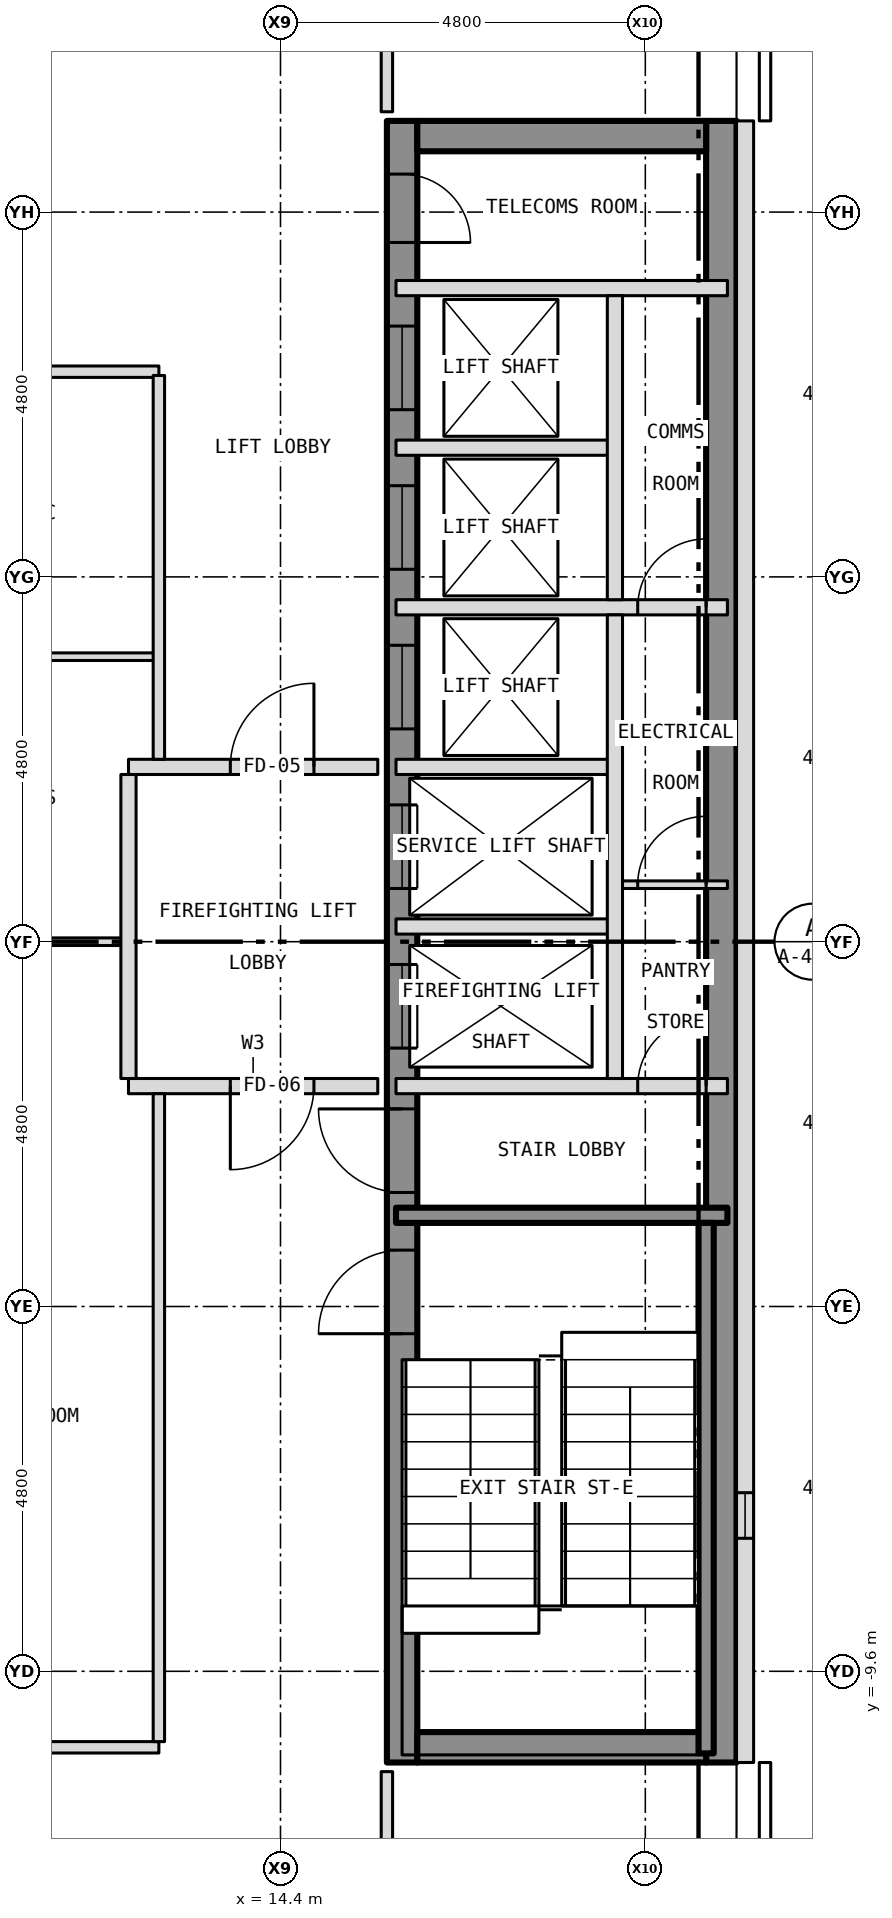
"""IFC4 building model, lengths in metres.
Left out: names, types, materials, properties, quantities, classifications, styles, units other than length and angle.
Written with IfcOpenShell. Run it as: python <this file> out.ifc"""

import sys

from ifc_helpers import new_model, si_unit, direction, frame, frame_2d, origin, place, context, subcontext, project, spatial, rectangle, extrude, element, fill, save


model = new_model("IFC4")
c1 = context("Model", 3, precision=1e-05, world=origin(), true_north=direction((0.0, 1.0)))
c2 = subcontext(c1, "Body", "Model", "MODEL_VIEW")
j1 = project(units=[si_unit("LENGTHUNIT", "METRE"), si_unit("PLANEANGLEUNIT", "RADIAN")], contexts=[c1])
p1 = place(None, origin())
s1 = spatial("IfcSite", under=j1, at=p1, CompositionType="ELEMENT")
p2 = place(p1, origin())
s2 = spatial("IfcBuilding", under=s1, at=p2, CompositionType="ELEMENT")
p3 = place(p2, frame((0.0, 0.0, 262.0)))
s3 = spatial("IfcBuildingStorey", under=s2, at=p3, CompositionType="ELEMENT", Elevation=262.0)
p4 = place(p3, frame((16.0, -10.8, 0.0), z_axis=(0.0, 0.0, 1.0), x_axis=(0.0, 1.0, 0.0)))
e1 = element("IfcWall", 1, at=p4, inside=s3, PredefinedType="SHEAR", context=c2, shape_type="SweptSolid", body=[
    extrude(rectangle(XDim=21.6, YDim=0.4, at=frame_2d((10.8, 0.0))), origin(), (0.0, 0.0, 1.0), 3.25),
])
p5 = place(p4, frame((9.4, 0.0, 0.0)))
e2 = element("IfcOpeningElement", 2, at=p5, cuts=e1, PredefinedType="OPENING", context=c2, shape_type="SweptSolid", body=[
    extrude(rectangle(XDim=1.1, YDim=2.1, at=frame_2d((0.55, 1.05))), frame((0.0, 0.212, 0.0), z_axis=(0.0, -1.0, 0.0), x_axis=(1.0, 0.0, 0.0)), (0.0, 0.0, 1.0), 0.424),
])
p6 = place(p4, frame((11.5, 0.0, 0.0)))
e3 = element("IfcOpeningElement", 3, at=p6, cuts=e1, PredefinedType="OPENING", context=c2, shape_type="SweptSolid", body=[
    extrude(rectangle(XDim=1.1, YDim=2.1, at=frame_2d((0.55, 1.05))), frame((0.0, 0.212, 0.0), z_axis=(0.0, -1.0, 0.0), x_axis=(1.0, 0.0, 0.0)), (0.0, 0.0, 1.0), 0.424),
])
p7 = place(p4, frame((13.6, 0.0, 0.0)))
e4 = element("IfcOpeningElement", 4, at=p7, cuts=e1, PredefinedType="OPENING", context=c2, shape_type="SweptSolid", body=[
    extrude(rectangle(XDim=1.1, YDim=2.1, at=frame_2d((0.55, 1.05))), frame((0.0, 0.212, 0.0), z_axis=(0.0, -1.0, 0.0), x_axis=(1.0, 0.0, 0.0)), (0.0, 0.0, 1.0), 0.424),
])
p8 = place(p4, frame((15.7, 0.0, 0.0)))
e5 = element("IfcOpeningElement", 5, at=p8, cuts=e1, PredefinedType="OPENING", context=c2, shape_type="SweptSolid", body=[
    extrude(rectangle(XDim=1.1, YDim=2.1, at=frame_2d((0.55, 1.05))), frame((0.0, 0.212, 0.0), z_axis=(0.0, -1.0, 0.0), x_axis=(1.0, 0.0, 0.0)), (0.0, 0.0, 1.0), 0.424),
])
p9 = place(p4, frame((17.8, 0.0, 0.0)))
e6 = element("IfcOpeningElement", 6, at=p9, cuts=e1, PredefinedType="OPENING", context=c2, shape_type="SweptSolid", body=[
    extrude(rectangle(XDim=1.1, YDim=2.1, at=frame_2d((0.55, 1.05))), frame((0.0, 0.212, 0.0), z_axis=(0.0, -1.0, 0.0), x_axis=(1.0, 0.0, 0.0)), (0.0, 0.0, 1.0), 0.424),
])
p10 = place(p4, frame((5.642, 0.0, 0.0)))
e7 = element("IfcOpeningElement", 7, at=p10, cuts=e1, PredefinedType="OPENING", context=c2, shape_type="SweptSolid", body=[
    extrude(rectangle(XDim=1.1, YDim=2.1, at=frame_2d((0.55, 1.05))), frame((0.0, 0.212, 0.0), z_axis=(0.0, -1.0, 0.0), x_axis=(1.0, 0.0, 0.0)), (0.0, 0.0, 1.0), 0.424),
])
p11 = place(p4, frame((7.5, 0.0, 0.0)))
e8 = element("IfcOpeningElement", 8, at=p11, cuts=e1, PredefinedType="OPENING", context=c2, shape_type="SweptSolid", body=[
    extrude(rectangle(XDim=1.1, YDim=2.1, at=frame_2d((0.55, 1.05))), frame((0.0, 0.212, 0.0), z_axis=(0.0, -1.0, 0.0), x_axis=(1.0, 0.0, 0.0)), (0.0, 0.0, 1.0), 0.424),
])
p12 = place(p4, frame((20.0, 0.0, 0.0)))
e9 = element("IfcOpeningElement", 9, at=p12, cuts=e1, PredefinedType="OPENING", context=c2, shape_type="SweptSolid", body=[
    extrude(rectangle(XDim=0.9, YDim=2.1, at=frame_2d((0.45, 1.05))), frame((0.0, 0.212, 0.0), z_axis=(0.0, -1.0, 0.0), x_axis=(1.0, 0.0, 0.0)), (0.0, 0.0, 1.0), 0.424),
])
p13 = place(p3, frame((20.2, -10.8, 0.0), z_axis=(0.0, 0.0, 1.0), x_axis=(0.0, 1.0, 0.0)))
e10 = element("IfcWall", 10, at=p13, inside=s3, PredefinedType="SHEAR", context=c2, shape_type="SweptSolid", body=[
    extrude(rectangle(XDim=21.6, YDim=0.4, at=frame_2d((10.8, 0.0))), origin(), (0.0, 0.0, 1.0), 3.25),
])
for number, where, z_axis, x_axis in (
    (11, (16.2, 10.6, 0.0), (0.0, 0.0, 1.0), (1.0, 0.0, 0.0)),
    (12, (16.2, -10.6, 0.0), (0.0, 0.0, 1.0), (1.0, 0.0, 0.0)),
):
    element("IfcWall", number, at=place(p3, frame(where, z_axis=z_axis, x_axis=x_axis)), inside=s3, PredefinedType="SHEAR", context=c2, shape_type="SweptSolid", body=[
        extrude(rectangle(XDim=3.8, YDim=0.4, at=frame_2d((1.9, 0.0))), origin(), (0.0, 0.0, 1.0), 3.25),
    ])
p14 = place(p3, frame((20.512, -10.8, 0.0), z_axis=(0.0, 0.0, 1.0), x_axis=(0.0, 1.0, 0.0)))
e13 = element("IfcWall", 13, at=p14, inside=s3, PredefinedType="SOLIDWALL", context=c2, shape_type="SweptSolid", body=[
    extrude(rectangle(XDim=21.6, YDim=0.225, at=frame_2d((10.8, 0.0))), origin(), (0.0, 0.0, 1.0), 3.5),
])
p15 = place(p14, frame((2.95, 0.0, 1.0)))
e14 = element("IfcOpeningElement", 14, at=p15, cuts=e13, PredefinedType="OPENING", context=c2, shape_type="SweptSolid", body=[
    extrude(rectangle(XDim=0.6, YDim=1.5, at=frame_2d((0.3, 0.75))), frame((0.0, 0.125, 0.0), z_axis=(0.0, -1.0, 0.0), x_axis=(1.0, 0.0, 0.0)), (0.0, 0.0, 1.0), 0.249),
])
p16 = place(p3, frame((8.1, -10.6, 0.0), z_axis=(0.0, 0.0, 1.0), x_axis=(1.0, 0.0, 0.0)))
e15 = element("IfcWall", 15, at=p16, inside=s3, PredefinedType="PARTITIONING", context=c2, shape_type="SweptSolid", body=[
    extrude(rectangle(XDim=4.7, YDim=0.15, at=frame_2d((2.35, 0.0))), origin(), (0.0, 0.0, 1.0), 3.25),
])
p17 = place(p3, frame((15.92, -3.6, 0.0), z_axis=(0.0, 0.0, 1.0), x_axis=(1.0, 0.0, 0.0)))
e16 = element("IfcWall", 16, at=p17, inside=s3, PredefinedType="SHEAR", context=c2, shape_type="SweptSolid", body=[
    extrude(rectangle(XDim=4.36, YDim=0.2, at=frame_2d((2.18, 0.0))), origin(), (0.0, 0.0, 1.0), 3.25),
])
p18 = place(p3, frame((12.4, -1.9, 0.0), z_axis=(0.0, 0.0, 1.0), x_axis=(1.0, 0.0, 0.0)))
e17 = element("IfcWall", 17, at=p18, inside=s3, PredefinedType="PARTITIONING", context=c2, shape_type="SweptSolid", body=[
    extrude(rectangle(XDim=3.28, YDim=0.2, at=frame_2d((1.64, 0.0))), origin(), (0.0, 0.0, 1.0), 3.25),
])
p19 = place(p18, frame((1.34, 0.0, 0.0)))
e18 = element("IfcOpeningElement", 18, at=p19, cuts=e17, PredefinedType="OPENING", context=c2, shape_type="SweptSolid", body=[
    extrude(rectangle(XDim=1.1, YDim=2.1, at=frame_2d((0.55, 1.05))), frame((0.0, 0.112, 0.0), z_axis=(0.0, -1.0, 0.0), x_axis=(1.0, 0.0, 0.0)), (0.0, 0.0, 1.0), 0.224),
])
p20 = place(p3, frame((15.92, -1.9, 0.0), z_axis=(0.0, 0.0, 1.0), x_axis=(1.0, 0.0, 0.0)))
e19 = element("IfcWall", 19, at=p20, inside=s3, PredefinedType="PARTITIONING", context=c2, shape_type="SweptSolid", body=[
    extrude(rectangle(XDim=4.36, YDim=0.2, at=frame_2d((2.18, 0.0))), origin(), (0.0, 0.0, 1.0), 3.25),
])
p21 = place(p20, frame((3.18, 0.0, 0.0)))
e20 = element("IfcOpeningElement", 20, at=p21, cuts=e19, PredefinedType="OPENING", context=c2, shape_type="SweptSolid", body=[
    extrude(rectangle(XDim=0.9, YDim=2.1, at=frame_2d((0.45, 1.05))), frame((0.0, 0.112, 0.0), z_axis=(0.0, -1.0, 0.0), x_axis=(1.0, 0.0, 0.0)), (0.0, 0.0, 1.0), 0.224),
])
p22 = place(p3, frame((9.784, 0.0, 0.0), z_axis=(0.0, 0.0, 1.0), x_axis=(1.0, 0.0, 0.0)))
e21 = element("IfcWall", 21, at=p22, inside=s3, PredefinedType="PARTITIONING", context=c2, shape_type="SweptSolid", body=[
    extrude(rectangle(XDim=2.616, YDim=0.1, at=frame_2d((1.308, 0.0))), origin(), (0.0, 0.0, 1.0), 2.16),
])
p23 = place(p3, frame((15.92, 0.2, 0.0), z_axis=(0.0, 0.0, 1.0), x_axis=(1.0, 0.0, 0.0)))
e22 = element("IfcWall", 22, at=p23, inside=s3, PredefinedType="PARTITIONING", context=c2, shape_type="SweptSolid", body=[
    extrude(rectangle(XDim=2.88, YDim=0.2, at=frame_2d((1.44, 0.0))), origin(), (0.0, 0.0, 1.0), 3.25),
])
p24 = place(p3, frame((18.8, 0.75, 0.0), z_axis=(0.0, 0.0, 1.0), x_axis=(1.0, 0.0, 0.0)))
e23 = element("IfcWall", 23, at=p24, inside=s3, PredefinedType="PARTITIONING", context=c2, shape_type="SweptSolid", body=[
    extrude(rectangle(XDim=1.48, YDim=0.1, at=frame_2d((0.74, 0.0))), origin(), (0.0, 0.0, 1.0), 3.25),
])
p25 = place(p24, frame((0.3, 0.0, 0.0)))
e24 = element("IfcOpeningElement", 24, at=p25, cuts=e23, PredefinedType="OPENING", context=c2, shape_type="SweptSolid", body=[
    extrude(rectangle(XDim=0.9, YDim=2.1, at=frame_2d((0.45, 1.05))), frame((0.0, 0.062, 0.0), z_axis=(0.0, -1.0, 0.0), x_axis=(1.0, 0.0, 0.0)), (0.0, 0.0, 1.0), 0.124),
])
p26 = place(p3, frame((12.4, 2.3, 0.0), z_axis=(0.0, 0.0, 1.0), x_axis=(1.0, 0.0, 0.0)))
e25 = element("IfcWall", 25, at=p26, inside=s3, PredefinedType="PARTITIONING", context=c2, shape_type="SweptSolid", body=[
    extrude(rectangle(XDim=3.28, YDim=0.2, at=frame_2d((1.64, 0.0))), origin(), (0.0, 0.0, 1.0), 3.25),
])
p27 = place(p26, frame((1.34, 0.0, 0.0)))
e26 = element("IfcOpeningElement", 26, at=p27, cuts=e25, PredefinedType="OPENING", context=c2, shape_type="SweptSolid", body=[
    extrude(rectangle(XDim=1.1, YDim=2.1, at=frame_2d((0.55, 1.05))), frame((0.0, 0.112, 0.0), z_axis=(0.0, -1.0, 0.0), x_axis=(1.0, 0.0, 0.0)), (0.0, 0.0, 1.0), 0.224),
])
p28 = place(p3, frame((15.92, 2.3, 0.0), z_axis=(0.0, 0.0, 1.0), x_axis=(1.0, 0.0, 0.0)))
e27 = element("IfcWall", 27, at=p28, inside=s3, PredefinedType="PARTITIONING", context=c2, shape_type="SweptSolid", body=[
    extrude(rectangle(XDim=2.88, YDim=0.2, at=frame_2d((1.44, 0.0))), origin(), (0.0, 0.0, 1.0), 3.25),
])
p29 = place(p3, frame((8.1, 3.75, 0.0), z_axis=(0.0, 0.0, 1.0), x_axis=(1.0, 0.0, 0.0)))
e28 = element("IfcWall", 28, at=p29, inside=s3, PredefinedType="PARTITIONING", context=c2, shape_type="SweptSolid", body=[
    extrude(rectangle(XDim=4.7, YDim=0.1, at=frame_2d((2.35, 0.0))), origin(), (0.0, 0.0, 1.0), 3.25),
])
p30 = place(p3, frame((15.92, 4.4, 0.0), z_axis=(0.0, 0.0, 1.0), x_axis=(1.0, 0.0, 0.0)))
e29 = element("IfcWall", 29, at=p30, inside=s3, PredefinedType="PARTITIONING", context=c2, shape_type="SweptSolid", body=[
    extrude(rectangle(XDim=4.36, YDim=0.2, at=frame_2d((2.18, 0.0))), origin(), (0.0, 0.0, 1.0), 3.25),
])
p31 = place(p30, frame((3.18, 0.0, 0.0)))
e30 = element("IfcOpeningElement", 30, at=p31, cuts=e29, PredefinedType="OPENING", context=c2, shape_type="SweptSolid", body=[
    extrude(rectangle(XDim=0.9, YDim=2.1, at=frame_2d((0.45, 1.05))), frame((0.0, 0.112, 0.0), z_axis=(0.0, -1.0, 0.0), x_axis=(1.0, 0.0, 0.0)), (0.0, 0.0, 1.0), 0.224),
])
p32 = place(p3, frame((15.92, 6.5, 0.0), z_axis=(0.0, 0.0, 1.0), x_axis=(1.0, 0.0, 0.0)))
e31 = element("IfcWall", 31, at=p32, inside=s3, PredefinedType="PARTITIONING", context=c2, shape_type="SweptSolid", body=[
    extrude(rectangle(XDim=2.88, YDim=0.2, at=frame_2d((1.44, 0.0))), origin(), (0.0, 0.0, 1.0), 3.25),
])
p33 = place(p3, frame((8.1, 7.5, 0.0), z_axis=(0.0, 0.0, 1.0), x_axis=(1.0, 0.0, 0.0)))
e32 = element("IfcWall", 32, at=p33, inside=s3, PredefinedType="PARTITIONING", context=c2, shape_type="SweptSolid", body=[
    extrude(rectangle(XDim=4.7, YDim=0.15, at=frame_2d((2.35, 0.0))), origin(), (0.0, 0.0, 1.0), 3.25),
])
p34 = place(p33, frame((1.9, 0.0, 0.0)))
e33 = element("IfcOpeningElement", 33, at=p34, cuts=e32, PredefinedType="OPENING", context=c2, shape_type="SweptSolid", body=[
    extrude(rectangle(XDim=0.9, YDim=2.1, at=frame_2d((0.45, 1.05))), frame((0.0, 0.087, 0.0), z_axis=(0.0, -1.0, 0.0), x_axis=(1.0, 0.0, 0.0)), (0.0, 0.0, 1.0), 0.174),
])
p35 = place(p3, frame((15.92, 8.6, 0.0), z_axis=(0.0, 0.0, 1.0), x_axis=(1.0, 0.0, 0.0)))
e34 = element("IfcWall", 34, at=p35, inside=s3, PredefinedType="PARTITIONING", context=c2, shape_type="SweptSolid", body=[
    extrude(rectangle(XDim=4.36, YDim=0.2, at=frame_2d((2.18, 0.0))), origin(), (0.0, 0.0, 1.0), 3.25),
])
p36 = place(p3, frame((12.4, -1.8, 0.0), z_axis=(0.0, 0.0, 1.0), x_axis=(0.0, 1.0, 0.0)))
e35 = element("IfcWall", 35, at=p36, inside=s3, PredefinedType="PARTITIONING", context=c2, shape_type="SweptSolid", body=[
    extrude(rectangle(XDim=4.0, YDim=0.2, at=frame_2d((2.0, 0.0))), origin(), (0.0, 0.0, 1.0), 3.25),
])
p37 = place(p3, frame((12.8, -10.525, 0.0), z_axis=(0.0, 0.0, 1.0), x_axis=(0.0, 1.0, 0.0)))
e36 = element("IfcWall", 36, at=p37, inside=s3, PredefinedType="PARTITIONING", context=c2, shape_type="SweptSolid", body=[
    extrude(rectangle(XDim=8.525, YDim=0.15, at=frame_2d((4.262, 0.0))), origin(), (0.0, 0.0, 1.0), 3.25),
])
p38 = place(p3, frame((12.8, 2.4, 0.0), z_axis=(0.0, 0.0, 1.0), x_axis=(0.0, 1.0, 0.0)))
e37 = element("IfcWall", 37, at=p38, inside=s3, PredefinedType="PARTITIONING", context=c2, shape_type="SweptSolid", body=[
    extrude(rectangle(XDim=5.05, YDim=0.15, at=frame_2d((2.525, 0.0))), origin(), (0.0, 0.0, 1.0), 3.25),
])
for number, where, z_axis, x_axis in (
    (38, (15.8, -12.725, 0.0), (0.0, 0.0, 1.0), (0.0, 1.0, 0.0)),
    (39, (15.8, 10.92, 0.0), (0.0, 0.0, 1.0), (0.0, 1.0, 0.0)),
):
    element("IfcWall", number, at=place(p3, frame(where, z_axis=z_axis, x_axis=x_axis)), inside=s3, PredefinedType="PARTITIONING", context=c2, shape_type="SweptSolid", body=[
        extrude(rectangle(XDim=1.805, YDim=0.15, at=frame_2d((0.903, 0.0))), origin(), (0.0, 0.0, 1.0), 3.25),
    ])
p39 = place(p3, frame((18.8, -1.8, 0.0), z_axis=(0.0, 0.0, 1.0), x_axis=(0.0, 1.0, 0.0)))
e40 = element("IfcWall", 40, at=p39, inside=s3, PredefinedType="PARTITIONING", context=c2, shape_type="SweptSolid", body=[
    extrude(rectangle(XDim=6.1, YDim=0.2, at=frame_2d((3.05, 0.0))), origin(), (0.0, 0.0, 1.0), 3.25),
])
p40 = place(p3, frame((18.8, 4.5, 0.0), z_axis=(0.0, 0.0, 1.0), x_axis=(0.0, 1.0, 0.0)))
e41 = element("IfcWall", 41, at=p40, inside=s3, PredefinedType="PARTITIONING", context=c2, shape_type="SweptSolid", body=[
    extrude(rectangle(XDim=4.0, YDim=0.2, at=frame_2d((2.0, 0.0))), origin(), (0.0, 0.0, 1.0), 3.25),
])
p41 = place(p3, frame((20.0, -10.68, 0.0), z_axis=(0.0, 0.0, 1.0), x_axis=(0.0, 1.0, 0.0)))
e42 = element("IfcWall", 42, at=p41, inside=s3, PredefinedType="SHEAR", context=c2, shape_type="SweptSolid", body=[
    extrude(rectangle(XDim=6.98, YDim=0.2, at=frame_2d((3.49, 0.0))), origin(), (0.0, 0.0, 1.0), 3.25),
])
p42 = place(p15, origin())
e43 = element("IfcWindow", 43, at=p42, inside=s3, PartitioningType="SINGLE_PANEL", PredefinedType="WINDOW", context=c2, shape_type="SweptSolid", body=[
    extrude(rectangle(XDim=0.6, YDim=1.5, at=frame_2d((0.3, 0.75))), frame((0.0, -0.022, 0.0), z_axis=(0.0, -1.0, 0.0), x_axis=(1.0, 0.0, 0.0)), (0.0, 0.0, 1.0), 0.06),
])
fill(e14, e43)
p43 = place(p5, origin())
e44 = element("IfcDoor", 44, at=p43, inside=s3, OperationType="SLIDING_TO_LEFT", PredefinedType="DOOR", context=c2, shape_type="SweptSolid", body=[
    extrude(rectangle(XDim=1.1, YDim=2.1, at=frame_2d((0.55, 1.05))), frame((0.0, 0.025, 0.0), z_axis=(0.0, -1.0, 0.0), x_axis=(1.0, 0.0, 0.0)), (0.0, 0.0, 1.0), 0.05),
])
fill(e2, e44)
p44 = place(p6, origin())
e45 = element("IfcDoor", 45, at=p44, inside=s3, OperationType="SLIDING_TO_LEFT", PredefinedType="DOOR", context=c2, shape_type="SweptSolid", body=[
    extrude(rectangle(XDim=1.1, YDim=2.1, at=frame_2d((0.55, 1.05))), frame((0.0, 0.025, 0.0), z_axis=(0.0, -1.0, 0.0), x_axis=(1.0, 0.0, 0.0)), (0.0, 0.0, 1.0), 0.05),
])
fill(e3, e45)
p45 = place(p7, origin())
e46 = element("IfcDoor", 46, at=p45, inside=s3, OperationType="SLIDING_TO_LEFT", PredefinedType="DOOR", context=c2, shape_type="SweptSolid", body=[
    extrude(rectangle(XDim=1.1, YDim=2.1, at=frame_2d((0.55, 1.05))), frame((0.0, 0.025, 0.0), z_axis=(0.0, -1.0, 0.0), x_axis=(1.0, 0.0, 0.0)), (0.0, 0.0, 1.0), 0.05),
])
fill(e4, e46)
p46 = place(p8, origin())
e47 = element("IfcDoor", 47, at=p46, inside=s3, OperationType="SLIDING_TO_LEFT", PredefinedType="DOOR", context=c2, shape_type="SweptSolid", body=[
    extrude(rectangle(XDim=1.1, YDim=2.1, at=frame_2d((0.55, 1.05))), frame((0.0, 0.025, 0.0), z_axis=(0.0, -1.0, 0.0), x_axis=(1.0, 0.0, 0.0)), (0.0, 0.0, 1.0), 0.05),
])
fill(e5, e47)
p47 = place(p9, origin())
e48 = element("IfcDoor", 48, at=p47, inside=s3, OperationType="SLIDING_TO_LEFT", PredefinedType="DOOR", context=c2, shape_type="SweptSolid", body=[
    extrude(rectangle(XDim=1.1, YDim=2.1, at=frame_2d((0.55, 1.05))), frame((0.0, 0.025, 0.0), z_axis=(0.0, -1.0, 0.0), x_axis=(1.0, 0.0, 0.0)), (0.0, 0.0, 1.0), 0.05),
])
fill(e6, e48)
p48 = place(p10, origin())
e49 = element("IfcDoor", 49, at=p48, inside=s3, OperationType="SINGLE_SWING_LEFT", PredefinedType="DOOR", context=c2, shape_type="SweptSolid", body=[
    extrude(rectangle(XDim=1.1, YDim=2.1, at=frame_2d((0.55, 1.05))), frame((0.0, 0.025, 0.0), z_axis=(0.0, -1.0, 0.0), x_axis=(1.0, 0.0, 0.0)), (0.0, 0.0, 1.0), 0.05),
])
fill(e7, e49)
p49 = place(p11, origin())
e50 = element("IfcDoor", 50, at=p49, inside=s3, OperationType="SINGLE_SWING_RIGHT", PredefinedType="DOOR", context=c2, shape_type="SweptSolid", body=[
    extrude(rectangle(XDim=1.1, YDim=2.1, at=frame_2d((0.55, 1.05))), frame((0.0, 0.025, 0.0), z_axis=(0.0, -1.0, 0.0), x_axis=(1.0, 0.0, 0.0)), (0.0, 0.0, 1.0), 0.05),
])
fill(e8, e50)
p50 = place(p12, origin())
e51 = element("IfcDoor", 51, at=p50, inside=s3, OperationType="SINGLE_SWING_LEFT", PredefinedType="DOOR", context=c2, shape_type="SweptSolid", body=[
    extrude(rectangle(XDim=0.9, YDim=2.1, at=frame_2d((0.45, 1.05))), frame((0.0, 0.025, 0.0), z_axis=(0.0, -1.0, 0.0), x_axis=(1.0, 0.0, 0.0)), (0.0, 0.0, 1.0), 0.05),
])
fill(e9, e51)
p51 = place(p21, origin())
e52 = element("IfcDoor", 52, at=p51, inside=s3, OperationType="SINGLE_SWING_RIGHT", PredefinedType="DOOR", context=c2, shape_type="SweptSolid", body=[
    extrude(rectangle(XDim=0.9, YDim=2.1, at=frame_2d((0.45, 1.05))), frame((0.0, 0.025, 0.0), z_axis=(0.0, -1.0, 0.0), x_axis=(1.0, 0.0, 0.0)), (0.0, 0.0, 1.0), 0.05),
])
fill(e20, e52)
p52 = place(p25, origin())
e53 = element("IfcDoor", 53, at=p52, inside=s3, OperationType="SINGLE_SWING_RIGHT", PredefinedType="DOOR", context=c2, shape_type="SweptSolid", body=[
    extrude(rectangle(XDim=0.9, YDim=2.1, at=frame_2d((0.45, 1.05))), frame((0.0, 0.025, 0.0), z_axis=(0.0, -1.0, 0.0), x_axis=(1.0, 0.0, 0.0)), (0.0, 0.0, 1.0), 0.05),
])
fill(e24, e53)
p53 = place(p31, origin())
e54 = element("IfcDoor", 54, at=p53, inside=s3, OperationType="SINGLE_SWING_RIGHT", PredefinedType="DOOR", context=c2, shape_type="SweptSolid", body=[
    extrude(rectangle(XDim=0.9, YDim=2.1, at=frame_2d((0.45, 1.05))), frame((0.0, 0.025, 0.0), z_axis=(0.0, -1.0, 0.0), x_axis=(1.0, 0.0, 0.0)), (0.0, 0.0, 1.0), 0.05),
])
fill(e30, e54)
p54 = place(p27, origin())
e55 = element("IfcDoor", 55, at=p54, inside=s3, OperationType="SINGLE_SWING_RIGHT", PredefinedType="DOOR", context=c2, shape_type="SweptSolid", body=[
    extrude(rectangle(XDim=1.1, YDim=2.1, at=frame_2d((0.55, 1.05))), frame((0.0, 0.025, 0.0), z_axis=(0.0, -1.0, 0.0), x_axis=(1.0, 0.0, 0.0)), (0.0, 0.0, 1.0), 0.05),
])
fill(e26, e55)
p55 = place(p19, origin())
e56 = element("IfcDoor", 56, at=p55, inside=s3, OperationType="SINGLE_SWING_LEFT", PredefinedType="DOOR", context=c2, shape_type="SweptSolid", body=[
    extrude(rectangle(XDim=1.1, YDim=2.1, at=frame_2d((0.55, 1.05))), frame((0.0, 0.025, 0.0), z_axis=(0.0, -1.0, 0.0), x_axis=(1.0, 0.0, 0.0)), (0.0, 0.0, 1.0), 0.05),
])
fill(e18, e56)
save(model, sys.argv[1])
